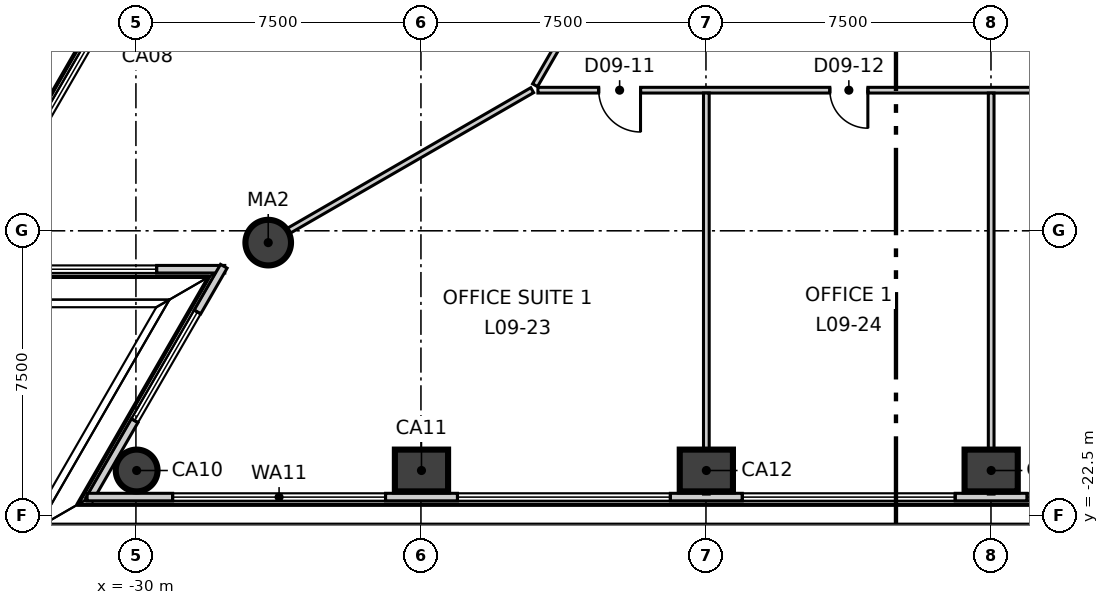
"""IFC4 building model, lengths in metres.
Left out: names, types, materials, properties, quantities, classifications, styles, units other than length and angle.
Written with IfcOpenShell. Run it as: python <this file> out.ifc"""

import sys

from ifc_helpers import new_model, si_unit, direction, frame, frame_2d, origin, origin_2d, place, context, subcontext, project, spatial, rectangle, circle, extrude, element, fill, save


model = new_model("IFC4")
c1 = context("Model", 3, precision=1e-05, world=origin(), true_north=direction((0.0, 1.0)))
c2 = subcontext(c1, "Body", "Model", "MODEL_VIEW")
j1 = project(units=[si_unit("LENGTHUNIT", "METRE"), si_unit("PLANEANGLEUNIT", "RADIAN")], contexts=[c1])
p1 = place(None, origin())
s1 = spatial("IfcSite", under=j1, at=p1, CompositionType="ELEMENT")
p2 = place(p1, origin())
s2 = spatial("IfcBuilding", under=s1, at=p2, CompositionType="ELEMENT")
p3 = place(p2, frame((0.0, 0.0, 47.3)))
s3 = spatial("IfcBuildingStorey", under=s2, at=p3, CompositionType="ELEMENT", Elevation=47.3)
p4 = place(p3, frame((-29.981, -21.307, -0.3), z_axis=(0.0, 0.0, 1.0), x_axis=(1.0, 0.0, 0.0)))
e1 = element("IfcColumn", 1, at=p4, inside=s3, PredefinedType="COLUMN", context=c2, shape_type="SweptSolid", body=[
    extrude(circle(Radius=0.55, at=origin_2d()), origin(), (0.0, 0.0, 1.0), 4.0),
])
for number, where, z_axis, x_axis in (
    (2, (-22.486, -21.307, -0.3), (0.0, 0.0, 1.0), (1.0, 0.0, 0.0)),
    (3, (-14.99, -21.307, -0.3), (0.0, 0.0, 1.0), (1.0, 0.0, 0.0)),
    (4, (-7.495, -21.307, -0.3), (0.0, 0.0, 1.0), (1.0, 0.0, 0.0)),
):
    element("IfcColumn", number, at=place(p3, frame(where, z_axis=z_axis, x_axis=x_axis)), inside=s3, PredefinedType="COLUMN", context=c2, shape_type="SweptSolid", body=[
        extrude(rectangle(XDim=1.4, YDim=1.1, at=origin_2d()), origin(), (0.0, 0.0, 1.0), 4.0),
    ])
p5 = place(p3, frame((-26.519, -15.311, -0.3), z_axis=(0.0, 0.0, 1.0), x_axis=(1.0, 0.0, 0.0)))
e5 = element("IfcColumn", 5, at=p5, inside=s3, PredefinedType="COLUMN", context=c2, shape_type="SweptSolid", body=[
    extrude(circle(Radius=0.6, at=origin_2d()), origin(), (0.0, 0.0, 1.0), 4.0),
])
p6 = place(p3, frame((-3.417, 38.096, 0.0), z_axis=(0.0, 0.0, 1.0), x_axis=(-0.500000412988, -0.866025165346, 0.0)))
e6 = element("IfcWall", 6, at=p6, inside=s3, PredefinedType="ELEMENTEDWALL", context=c2, shape_type="SweptSolid", body=[
    extrude(rectangle(XDim=62.548, YDim=0.2, at=frame_2d((31.274, 0.0))), origin(), (0.0, 0.0, 1.0), 3.7),
])
p7 = place(p6, frame((2.25, 0.0, 0.9)))
e7 = element("IfcOpeningElement", 7, at=p7, cuts=e6, PredefinedType="OPENING", context=c2, shape_type="SweptSolid", body=[
    extrude(rectangle(XDim=5.6, YDim=2.5, at=frame_2d((2.8, 1.25))), frame((0.0, 0.11, 0.0), z_axis=(0.0, -1.0, 0.0), x_axis=(1.0, 0.0, 0.0)), (0.0, 0.0, 1.0), 0.22),
])
p8 = place(p6, frame((9.745, 0.0, 0.9)))
e8 = element("IfcOpeningElement", 8, at=p8, cuts=e6, PredefinedType="OPENING", context=c2, shape_type="SweptSolid", body=[
    extrude(rectangle(XDim=5.6, YDim=2.5, at=frame_2d((2.8, 1.25))), frame((0.0, 0.11, 0.0), z_axis=(0.0, -1.0, 0.0), x_axis=(1.0, 0.0, 0.0)), (0.0, 0.0, 1.0), 0.22),
])
p9 = place(p6, frame((17.241, 0.0, 0.9)))
e9 = element("IfcOpeningElement", 9, at=p9, cuts=e6, PredefinedType="OPENING", context=c2, shape_type="SweptSolid", body=[
    extrude(rectangle(XDim=5.6, YDim=2.5, at=frame_2d((2.8, 1.25))), frame((0.0, 0.11, 0.0), z_axis=(0.0, -1.0, 0.0), x_axis=(1.0, 0.0, 0.0)), (0.0, 0.0, 1.0), 0.22),
])
p10 = place(p6, frame((24.736, 0.0, 0.9)))
e10 = element("IfcOpeningElement", 10, at=p10, cuts=e6, PredefinedType="OPENING", context=c2, shape_type="SweptSolid", body=[
    extrude(rectangle(XDim=5.6, YDim=2.5, at=frame_2d((2.8, 1.25))), frame((0.0, 0.11, 0.0), z_axis=(0.0, -1.0, 0.0), x_axis=(1.0, 0.0, 0.0)), (0.0, 0.0, 1.0), 0.22),
])
p11 = place(p6, frame((32.231, 0.0, 0.9)))
e11 = element("IfcOpeningElement", 11, at=p11, cuts=e6, PredefinedType="OPENING", context=c2, shape_type="SweptSolid", body=[
    extrude(rectangle(XDim=5.6, YDim=2.5, at=frame_2d((2.8, 1.25))), frame((0.0, 0.11, 0.0), z_axis=(0.0, -1.0, 0.0), x_axis=(1.0, 0.0, 0.0)), (0.0, 0.0, 1.0), 0.22),
])
p12 = place(p6, frame((39.727, 0.0, 0.9)))
e12 = element("IfcOpeningElement", 12, at=p12, cuts=e6, PredefinedType="OPENING", context=c2, shape_type="SweptSolid", body=[
    extrude(rectangle(XDim=5.6, YDim=2.5, at=frame_2d((2.8, 1.25))), frame((0.0, 0.11, 0.0), z_axis=(0.0, -1.0, 0.0), x_axis=(1.0, 0.0, 0.0)), (0.0, 0.0, 1.0), 0.22),
])
p13 = place(p6, frame((47.222, 0.0, 0.9)))
e13 = element("IfcOpeningElement", 13, at=p13, cuts=e6, PredefinedType="OPENING", context=c2, shape_type="SweptSolid", body=[
    extrude(rectangle(XDim=5.6, YDim=2.5, at=frame_2d((2.8, 1.25))), frame((0.0, 0.11, 0.0), z_axis=(0.0, -1.0, 0.0), x_axis=(1.0, 0.0, 0.0)), (0.0, 0.0, 1.0), 0.22),
])
p14 = place(p6, frame((54.717, 0.0, 0.9)))
e14 = element("IfcOpeningElement", 14, at=p14, cuts=e6, PredefinedType="OPENING", context=c2, shape_type="SweptSolid", body=[
    extrude(rectangle(XDim=5.6, YDim=2.5, at=frame_2d((2.8, 1.25))), frame((0.0, 0.11, 0.0), z_axis=(0.0, -1.0, 0.0), x_axis=(1.0, 0.0, 0.0)), (0.0, 0.0, 1.0), 0.22),
])
p15 = place(p3, frame((-34.746, -16.011, 0.0), z_axis=(0.0, 0.0, 1.0), x_axis=(1.0, 0.0, 0.0)))
e15 = element("IfcWall", 15, at=p15, inside=s3, PredefinedType="ELEMENTEDWALL", context=c2, shape_type="SweptSolid", body=[
    extrude(rectangle(XDim=7.084, YDim=0.2, at=frame_2d((3.542, 0.0))), origin(), (0.0, 0.0, 1.0), 3.7),
])
p16 = place(p15, frame((1.99, 0.0, 0.9)))
e16 = element("IfcOpeningElement", 16, at=p16, cuts=e15, PredefinedType="OPENING", context=c2, shape_type="SweptSolid", body=[
    extrude(rectangle(XDim=3.3, YDim=2.5, at=frame_2d((1.65, 1.25))), frame((0.0, 0.11, 0.0), z_axis=(0.0, -1.0, 0.0), x_axis=(1.0, 0.0, 0.0)), (0.0, 0.0, 1.0), 0.22),
])
p17 = place(p3, frame((-27.687, -15.933, 0.0), z_axis=(0.0, 0.0, 1.0), x_axis=(-0.499993928037, -0.866028909405, 0.0)))
e17 = element("IfcWall", 17, at=p17, inside=s3, PredefinedType="ELEMENTEDWALL", context=c2, shape_type="SweptSolid", body=[
    extrude(rectangle(XDim=7.084, YDim=0.2, at=frame_2d((3.542, 0.0))), origin(), (0.0, 0.0, 1.0), 3.7),
])
p18 = place(p17, frame((1.39, 0.0, 0.9)))
e18 = element("IfcOpeningElement", 18, at=p18, cuts=e17, PredefinedType="OPENING", context=c2, shape_type="SweptSolid", body=[
    extrude(rectangle(XDim=3.3, YDim=2.5, at=frame_2d((1.65, 1.25))), frame((0.0, 0.11, 0.0), z_axis=(0.0, -1.0, 0.0), x_axis=(1.0, 0.0, 0.0)), (0.0, 0.0, 1.0), 0.22),
])
p19 = place(p3, frame((-31.284, -22.007, 0.0), z_axis=(0.0, 0.0, 1.0), x_axis=(1.0, 0.0, 0.0)))
e19 = element("IfcWall", 19, at=p19, inside=s3, PredefinedType="ELEMENTEDWALL", context=c2, shape_type="SweptSolid", body=[
    extrude(rectangle(XDim=62.548, YDim=0.2, at=frame_2d((31.274, 0.0))), origin(), (0.0, 0.0, 1.0), 3.7),
])
p20 = place(p19, frame((2.251, 0.0, 0.9)))
e20 = element("IfcOpeningElement", 20, at=p20, cuts=e19, PredefinedType="OPENING", context=c2, shape_type="SweptSolid", body=[
    extrude(rectangle(XDim=5.6, YDim=2.5, at=frame_2d((2.8, 1.25))), frame((0.0, 0.11, 0.0), z_axis=(0.0, -1.0, 0.0), x_axis=(1.0, 0.0, 0.0)), (0.0, 0.0, 1.0), 0.22),
])
p21 = place(p19, frame((9.746, 0.0, 0.9)))
e21 = element("IfcOpeningElement", 21, at=p21, cuts=e19, PredefinedType="OPENING", context=c2, shape_type="SweptSolid", body=[
    extrude(rectangle(XDim=5.6, YDim=2.5, at=frame_2d((2.8, 1.25))), frame((0.0, 0.11, 0.0), z_axis=(0.0, -1.0, 0.0), x_axis=(1.0, 0.0, 0.0)), (0.0, 0.0, 1.0), 0.22),
])
p22 = place(p19, frame((17.241, 0.0, 0.9)))
e22 = element("IfcOpeningElement", 22, at=p22, cuts=e19, PredefinedType="OPENING", context=c2, shape_type="SweptSolid", body=[
    extrude(rectangle(XDim=5.6, YDim=2.5, at=frame_2d((2.8, 1.25))), frame((0.0, 0.11, 0.0), z_axis=(0.0, -1.0, 0.0), x_axis=(1.0, 0.0, 0.0)), (0.0, 0.0, 1.0), 0.22),
])
p23 = place(p19, frame((24.736, 0.0, 0.9)))
e23 = element("IfcOpeningElement", 23, at=p23, cuts=e19, PredefinedType="OPENING", context=c2, shape_type="SweptSolid", body=[
    extrude(rectangle(XDim=5.6, YDim=2.5, at=frame_2d((2.8, 1.25))), frame((0.0, 0.11, 0.0), z_axis=(0.0, -1.0, 0.0), x_axis=(1.0, 0.0, 0.0)), (0.0, 0.0, 1.0), 0.22),
])
p24 = place(p19, frame((32.232, 0.0, 0.9)))
e24 = element("IfcOpeningElement", 24, at=p24, cuts=e19, PredefinedType="OPENING", context=c2, shape_type="SweptSolid", body=[
    extrude(rectangle(XDim=5.6, YDim=2.5, at=frame_2d((2.8, 1.25))), frame((0.0, 0.11, 0.0), z_axis=(0.0, -1.0, 0.0), x_axis=(1.0, 0.0, 0.0)), (0.0, 0.0, 1.0), 0.22),
])
p25 = place(p19, frame((39.727, 0.0, 0.9)))
e25 = element("IfcOpeningElement", 25, at=p25, cuts=e19, PredefinedType="OPENING", context=c2, shape_type="SweptSolid", body=[
    extrude(rectangle(XDim=5.6, YDim=2.5, at=frame_2d((2.8, 1.25))), frame((0.0, 0.11, 0.0), z_axis=(0.0, -1.0, 0.0), x_axis=(1.0, 0.0, 0.0)), (0.0, 0.0, 1.0), 0.22),
])
p26 = place(p19, frame((47.222, 0.0, 0.9)))
e26 = element("IfcOpeningElement", 26, at=p26, cuts=e19, PredefinedType="OPENING", context=c2, shape_type="SweptSolid", body=[
    extrude(rectangle(XDim=5.6, YDim=2.5, at=frame_2d((2.8, 1.25))), frame((0.0, 0.11, 0.0), z_axis=(0.0, -1.0, 0.0), x_axis=(1.0, 0.0, 0.0)), (0.0, 0.0, 1.0), 0.22),
])
p27 = place(p19, frame((54.717, 0.0, 0.9)))
e27 = element("IfcOpeningElement", 27, at=p27, cuts=e19, PredefinedType="OPENING", context=c2, shape_type="SweptSolid", body=[
    extrude(rectangle(XDim=5.6, YDim=2.5, at=frame_2d((2.8, 1.25))), frame((0.0, 0.11, 0.0), z_axis=(0.0, -1.0, 0.0), x_axis=(1.0, 0.0, 0.0)), (0.0, 0.0, 1.0), 0.22),
])
p28 = place(p3, frame((-27.056, -15.621, 0.0), z_axis=(0.0, 0.0, 1.0), x_axis=(0.866014334421, 0.50001917221, 0.0)))
e28 = element("IfcWall", 28, at=p28, inside=s3, PredefinedType="PARTITIONING", context=c2, shape_type="SweptSolid", body=[
    extrude(rectangle(XDim=8.642, YDim=0.15, at=frame_2d((4.321, 0.0))), origin(), (0.0, 0.0, 1.0), 3.1),
])
p29 = place(p3, frame((-19.497, -11.17, 0.0), z_axis=(0.0, 0.0, 1.0), x_axis=(0.499998854553, 0.866026065108, 0.0)))
e29 = element("IfcWall", 29, at=p29, inside=s3, PredefinedType="PARTITIONING", context=c2, shape_type="SweptSolid", body=[
    extrude(rectangle(XDim=38.994, YDim=0.15, at=frame_2d((19.497, 0.0))), origin(), (0.0, 0.0, 1.0), 3.7),
])
p30 = place(p29, frame((36.144, 0.0, 0.0)))
e30 = element("IfcOpeningElement", 30, at=p30, cuts=e29, PredefinedType="OPENING", context=c2, shape_type="SweptSolid", body=[
    extrude(rectangle(XDim=1.1, YDim=2.1, at=frame_2d((0.55, 1.05))), frame((0.0, 0.085, 0.0), z_axis=(0.0, -1.0, 0.0), x_axis=(1.0, 0.0, 0.0)), (0.0, 0.0, 1.0), 0.17),
])
p31 = place(p29, frame((21.963, 0.0, 0.0)))
e31 = element("IfcOpeningElement", 31, at=p31, cuts=e29, PredefinedType="OPENING", context=c2, shape_type="SweptSolid", body=[
    extrude(rectangle(XDim=1.1, YDim=2.1, at=frame_2d((0.55, 1.05))), frame((0.0, 0.085, 0.0), z_axis=(0.0, -1.0, 0.0), x_axis=(1.0, 0.0, 0.0)), (0.0, 0.0, 1.0), 0.17),
])
p32 = place(p29, frame((32.363, 0.0, 0.0)))
e32 = element("IfcOpeningElement", 32, at=p32, cuts=e29, PredefinedType="OPENING", context=c2, shape_type="SweptSolid", body=[
    extrude(rectangle(XDim=0.9, YDim=2.1, at=frame_2d((0.45, 1.05))), frame((0.0, 0.085, 0.0), z_axis=(0.0, -1.0, 0.0), x_axis=(1.0, 0.0, 0.0)), (0.0, 0.0, 1.0), 0.17),
])
p33 = place(p29, frame((29.163, 0.0, 0.0)))
e33 = element("IfcOpeningElement", 33, at=p33, cuts=e29, PredefinedType="OPENING", context=c2, shape_type="SweptSolid", body=[
    extrude(rectangle(XDim=0.9, YDim=2.1, at=frame_2d((0.45, 1.05))), frame((0.0, 0.085, 0.0), z_axis=(0.0, -1.0, 0.0), x_axis=(1.0, 0.0, 0.0)), (0.0, 0.0, 1.0), 0.17),
])
p34 = place(p29, frame((26.263, 0.0, 0.0)))
e34 = element("IfcOpeningElement", 34, at=p34, cuts=e29, PredefinedType="OPENING", context=c2, shape_type="SweptSolid", body=[
    extrude(rectangle(XDim=1.0, YDim=2.1, at=frame_2d((0.5, 1.05))), frame((0.0, 0.085, 0.0), z_axis=(0.0, -1.0, 0.0), x_axis=(1.0, 0.0, 0.0)), (0.0, 0.0, 1.0), 0.17),
])
p35 = place(p29, frame((11.373, 0.0, 0.0)))
e35 = element("IfcOpeningElement", 35, at=p35, cuts=e29, PredefinedType="OPENING", context=c2, shape_type="SweptSolid", body=[
    extrude(rectangle(XDim=1.1, YDim=2.1, at=frame_2d((0.55, 1.05))), frame((0.0, 0.085, 0.0), z_axis=(0.0, -1.0, 0.0), x_axis=(1.0, 0.0, 0.0)), (0.0, 0.0, 1.0), 0.17),
])
p36 = place(p29, frame((1.581, 0.0, 0.0)))
e36 = element("IfcOpeningElement", 36, at=p36, cuts=e29, PredefinedType="OPENING", context=c2, shape_type="SweptSolid", body=[
    extrude(rectangle(XDim=1.1, YDim=2.1, at=frame_2d((0.55, 1.05))), frame((0.0, 0.085, 0.0), z_axis=(0.0, -1.0, 0.0), x_axis=(1.0, 0.0, 0.0)), (0.0, 0.0, 1.0), 0.17),
])
p37 = place(p3, frame((-19.422, -11.3, 0.0), z_axis=(0.0, 0.0, 1.0), x_axis=(1.0, 0.0, 0.0)))
e37 = element("IfcWall", 37, at=p37, inside=s3, PredefinedType="PARTITIONING", context=c2, shape_type="SweptSolid", body=[
    extrude(rectangle(XDim=38.994, YDim=0.15, at=frame_2d((19.497, 0.0))), origin(), (0.0, 0.0, 1.0), 3.7),
])
p38 = place(p37, frame((1.6, 0.0, 0.0)))
e38 = element("IfcOpeningElement", 38, at=p38, cuts=e37, PredefinedType="OPENING", context=c2, shape_type="SweptSolid", body=[
    extrude(rectangle(XDim=1.1, YDim=2.1, at=frame_2d((0.55, 1.05))), frame((0.0, 0.085, 0.0), z_axis=(0.0, -1.0, 0.0), x_axis=(1.0, 0.0, 0.0)), (0.0, 0.0, 1.0), 0.17),
])
p39 = place(p37, frame((7.682, 0.0, 0.0)))
e39 = element("IfcOpeningElement", 39, at=p39, cuts=e37, PredefinedType="OPENING", context=c2, shape_type="SweptSolid", body=[
    extrude(rectangle(XDim=1.0, YDim=2.1, at=frame_2d((0.5, 1.05))), frame((0.0, 0.085, 0.0), z_axis=(0.0, -1.0, 0.0), x_axis=(1.0, 0.0, 0.0)), (0.0, 0.0, 1.0), 0.17),
])
p40 = place(p37, frame((15.177, 0.0, 0.0)))
e40 = element("IfcOpeningElement", 40, at=p40, cuts=e37, PredefinedType="OPENING", context=c2, shape_type="SweptSolid", body=[
    extrude(rectangle(XDim=1.0, YDim=2.1, at=frame_2d((0.5, 1.05))), frame((0.0, 0.085, 0.0), z_axis=(0.0, -1.0, 0.0), x_axis=(1.0, 0.0, 0.0)), (0.0, 0.0, 1.0), 0.17),
])
p41 = place(p37, frame((29.372, 0.0, 0.0)))
e41 = element("IfcOpeningElement", 41, at=p41, cuts=e37, PredefinedType="OPENING", context=c2, shape_type="SweptSolid", body=[
    extrude(rectangle(XDim=1.1, YDim=2.1, at=frame_2d((0.55, 1.05))), frame((0.0, 0.085, 0.0), z_axis=(0.0, -1.0, 0.0), x_axis=(1.0, 0.0, 0.0)), (0.0, 0.0, 1.0), 0.17),
])
p42 = place(p37, frame((20.772, 0.0, 0.0)))
e42 = element("IfcOpeningElement", 42, at=p42, cuts=e37, PredefinedType="OPENING", context=c2, shape_type="SweptSolid", body=[
    extrude(rectangle(XDim=0.9, YDim=2.1, at=frame_2d((0.45, 1.05))), frame((0.0, 0.085, 0.0), z_axis=(0.0, -1.0, 0.0), x_axis=(1.0, 0.0, 0.0)), (0.0, 0.0, 1.0), 0.17),
])
p43 = place(p37, frame((23.772, 0.0, 0.0)))
e43 = element("IfcOpeningElement", 43, at=p43, cuts=e37, PredefinedType="OPENING", context=c2, shape_type="SweptSolid", body=[
    extrude(rectangle(XDim=0.9, YDim=2.1, at=frame_2d((0.45, 1.05))), frame((0.0, 0.085, 0.0), z_axis=(0.0, -1.0, 0.0), x_axis=(1.0, 0.0, 0.0)), (0.0, 0.0, 1.0), 0.17),
])
p44 = place(p37, frame((36.163, 0.0, 0.0)))
e44 = element("IfcOpeningElement", 44, at=p44, cuts=e37, PredefinedType="OPENING", context=c2, shape_type="SweptSolid", body=[
    extrude(rectangle(XDim=1.1, YDim=2.1, at=frame_2d((0.55, 1.05))), frame((0.0, 0.085, 0.0), z_axis=(0.0, -1.0, 0.0), x_axis=(1.0, 0.0, 0.0)), (0.0, 0.0, 1.0), 0.17),
])
for number, where, z_axis, x_axis in (
    (45, (-14.99, -21.927, 0.0), (0.0, 0.0, 1.0), (0.0, 1.0, 0.0)),
    (46, (-7.495, -21.927, 0.0), (0.0, 0.0, 1.0), (0.0, 1.0, 0.0)),
):
    element("IfcWall", number, at=place(p3, frame(where, z_axis=z_axis, x_axis=x_axis)), inside=s3, PredefinedType="PARTITIONING", context=c2, shape_type="SweptSolid", body=[
        extrude(rectangle(XDim=10.552, YDim=0.15, at=frame_2d((5.276, 0.0))), origin(), (0.0, 0.0, 1.0), 3.7),
    ])
p45 = place(p14, origin())
e47 = element("IfcWindow", 47, at=p45, inside=s3, PartitioningType="SINGLE_PANEL", PredefinedType="WINDOW", context=c2, shape_type="SweptSolid", body=[
    extrude(rectangle(XDim=5.6, YDim=2.5, at=frame_2d((2.8, 1.25))), frame((0.0, 0.03, 0.0), z_axis=(0.0, -1.0, 0.0), x_axis=(1.0, 0.0, 0.0)), (0.0, 0.0, 1.0), 0.06),
])
fill(e14, e47)
p46 = place(p16, origin())
e48 = element("IfcWindow", 48, at=p46, inside=s3, PartitioningType="SINGLE_PANEL", PredefinedType="WINDOW", context=c2, shape_type="SweptSolid", body=[
    extrude(rectangle(XDim=3.3, YDim=2.5, at=frame_2d((1.65, 1.25))), frame((0.0, 0.03, 0.0), z_axis=(0.0, -1.0, 0.0), x_axis=(1.0, 0.0, 0.0)), (0.0, 0.0, 1.0), 0.06),
])
fill(e16, e48)
p47 = place(p18, origin())
e49 = element("IfcWindow", 49, at=p47, inside=s3, PartitioningType="SINGLE_PANEL", PredefinedType="WINDOW", context=c2, shape_type="SweptSolid", body=[
    extrude(rectangle(XDim=3.3, YDim=2.5, at=frame_2d((1.65, 1.25))), frame((0.0, 0.03, 0.0), z_axis=(0.0, -1.0, 0.0), x_axis=(1.0, 0.0, 0.0)), (0.0, 0.0, 1.0), 0.06),
])
fill(e18, e49)
p48 = place(p20, origin())
e50 = element("IfcWindow", 50, at=p48, inside=s3, PartitioningType="SINGLE_PANEL", PredefinedType="WINDOW", context=c2, shape_type="SweptSolid", body=[
    extrude(rectangle(XDim=5.6, YDim=2.5, at=frame_2d((2.8, 1.25))), frame((0.0, 0.03, 0.0), z_axis=(0.0, -1.0, 0.0), x_axis=(1.0, 0.0, 0.0)), (0.0, 0.0, 1.0), 0.06),
])
fill(e20, e50)
p49 = place(p21, origin())
e51 = element("IfcWindow", 51, at=p49, inside=s3, PartitioningType="SINGLE_PANEL", PredefinedType="WINDOW", context=c2, shape_type="SweptSolid", body=[
    extrude(rectangle(XDim=5.6, YDim=2.5, at=frame_2d((2.8, 1.25))), frame((0.0, 0.03, 0.0), z_axis=(0.0, -1.0, 0.0), x_axis=(1.0, 0.0, 0.0)), (0.0, 0.0, 1.0), 0.06),
])
fill(e21, e51)
p50 = place(p22, origin())
e52 = element("IfcWindow", 52, at=p50, inside=s3, PartitioningType="SINGLE_PANEL", PredefinedType="WINDOW", context=c2, shape_type="SweptSolid", body=[
    extrude(rectangle(XDim=5.6, YDim=2.5, at=frame_2d((2.8, 1.25))), frame((0.0, 0.03, 0.0), z_axis=(0.0, -1.0, 0.0), x_axis=(1.0, 0.0, 0.0)), (0.0, 0.0, 1.0), 0.06),
])
fill(e22, e52)
p51 = place(p23, origin())
e53 = element("IfcWindow", 53, at=p51, inside=s3, PartitioningType="SINGLE_PANEL", PredefinedType="WINDOW", context=c2, shape_type="SweptSolid", body=[
    extrude(rectangle(XDim=5.6, YDim=2.5, at=frame_2d((2.8, 1.25))), frame((0.0, 0.03, 0.0), z_axis=(0.0, -1.0, 0.0), x_axis=(1.0, 0.0, 0.0)), (0.0, 0.0, 1.0), 0.06),
])
fill(e23, e53)
p52 = place(p38, origin())
e54 = element("IfcDoor", 54, at=p52, inside=s3, OperationType="SINGLE_SWING_RIGHT", PredefinedType="DOOR", context=c2, shape_type="SweptSolid", body=[
    extrude(rectangle(XDim=1.1, YDim=2.1, at=frame_2d((0.55, 1.05))), frame((0.0, 0.025, 0.0), z_axis=(0.0, -1.0, 0.0), x_axis=(1.0, 0.0, 0.0)), (0.0, 0.0, 1.0), 0.05),
])
fill(e38, e54)
p53 = place(p39, origin())
e55 = element("IfcDoor", 55, at=p53, inside=s3, OperationType="SINGLE_SWING_RIGHT", PredefinedType="DOOR", context=c2, shape_type="SweptSolid", body=[
    extrude(rectangle(XDim=1.0, YDim=2.1, at=frame_2d((0.5, 1.05))), frame((0.0, 0.025, 0.0), z_axis=(0.0, -1.0, 0.0), x_axis=(1.0, 0.0, 0.0)), (0.0, 0.0, 1.0), 0.05),
])
fill(e39, e55)
save(model, sys.argv[1])
